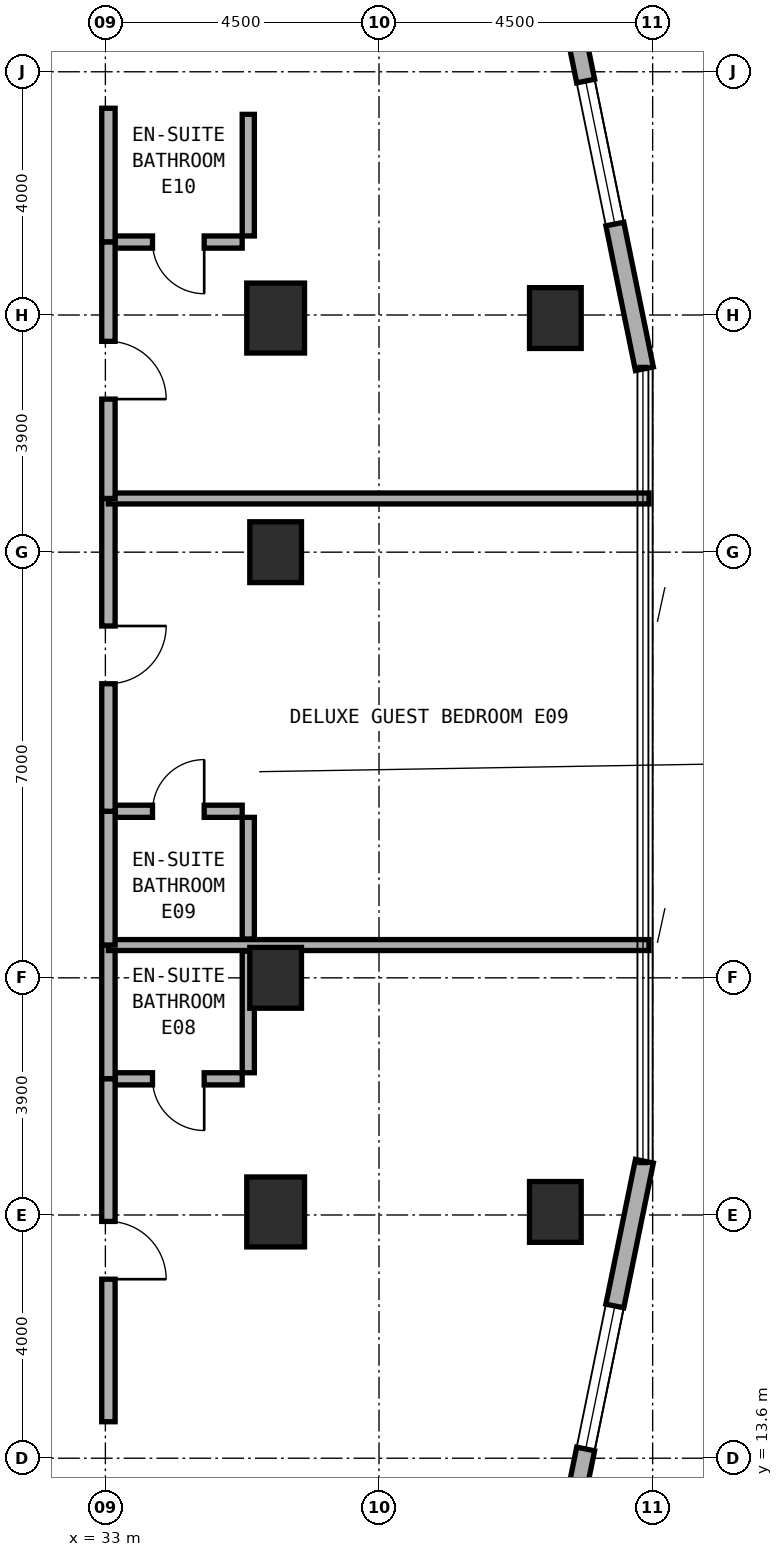
"""IFC4 building model, lengths in metres.
Left out: names, types, materials, properties, quantities, classifications, styles, units other than length and angle.
Written with IfcOpenShell. Run it as: python <this file> out.ifc"""

import sys

from ifc_helpers import new_model, si_unit, direction, frame, frame_2d, origin, origin_2d, place, context, subcontext, project, spatial, rectangle, extrude, element, fill, save


model = new_model("IFC4")
c1 = context("Model", 3, precision=1e-05, world=origin(), true_north=direction((0.0, 1.0)))
c2 = subcontext(c1, "Body", "Model", "MODEL_VIEW")
j1 = project(units=[si_unit("LENGTHUNIT", "METRE"), si_unit("PLANEANGLEUNIT", "RADIAN")], contexts=[c1])
p1 = place(None, origin())
s1 = spatial("IfcSite", under=j1, at=p1, CompositionType="ELEMENT")
p2 = place(p1, origin())
s2 = spatial("IfcBuilding", under=s1, at=p2, CompositionType="ELEMENT")
p3 = place(p2, frame((0.0, 0.0, 80.0)))
s3 = spatial("IfcBuildingStorey", under=s2, at=p3, CompositionType="ELEMENT", Elevation=80.0)
for number, where, z_axis, x_axis in (
    (1, (35.8, 21.5, 0.0), (0.0, 0.0, 1.0), (1.0, 0.0, 0.0)),
    (2, (35.8, 28.5, 0.0), (0.0, 0.0, 1.0), (1.0, 0.0, 0.0)),
):
    element("IfcColumn", number, at=place(p3, frame(where, z_axis=z_axis, x_axis=x_axis)), inside=s3, PredefinedType="COLUMN", context=c2, shape_type="SweptSolid", body=[
        extrude(rectangle(XDim=0.85, YDim=1.0, at=origin_2d()), origin(), (0.0, 0.0, 1.0), 3.5),
    ])
for number, where, z_axis, x_axis in (
    (3, (35.8, 17.65, 0.0), (0.0, 0.0, 1.0), (1.0, 0.0, 0.0)),
    (4, (35.8, 32.35, 0.0), (0.0, 0.0, 1.0), (1.0, 0.0, 0.0)),
):
    element("IfcColumn", number, at=place(p3, frame(where, z_axis=z_axis, x_axis=x_axis)), inside=s3, PredefinedType="COLUMN", context=c2, shape_type="SweptSolid", body=[
        extrude(rectangle(XDim=0.95, YDim=1.15, at=origin_2d()), origin(), (0.0, 0.0, 1.0), 3.5),
    ])
for number, where, z_axis, x_axis in (
    (5, (40.4, 17.65, 0.0), (0.0, 0.0, 1.0), (1.0, 0.0, 0.0)),
    (6, (40.4, 32.35, 0.0), (0.0, 0.0, 1.0), (1.0, 0.0, 0.0)),
):
    element("IfcColumn", number, at=place(p3, frame(where, z_axis=z_axis, x_axis=x_axis)), inside=s3, PredefinedType="COLUMN", context=c2, shape_type="SweptSolid", body=[
        extrude(rectangle(XDim=0.85, YDim=1.0, at=origin_2d()), origin(), (0.0, 0.0, 1.0), 3.5),
    ])
p4 = place(p3, frame((39.851, 8.622, 0.0), z_axis=(0.0, 0.0, 1.0), x_axis=(0.199990901713, 0.979797754249, 0.0)))
e7 = element("IfcWall", 7, at=p4, inside=s3, PredefinedType="STANDARD", context=c2, shape_type="SweptSolid", body=[
    extrude(rectangle(XDim=10.065, YDim=0.3, at=frame_2d((5.033, 0.0))), origin(), (0.0, 0.0, 1.0), 3.22),
])
p5 = place(p4, frame((0.378, 0.0, 0.85)))
e8 = element("IfcOpeningElement", 8, at=p5, cuts=e7, PredefinedType="OPENING", context=c2, shape_type="SweptSolid", body=[
    extrude(rectangle(XDim=1.8, YDim=1.5, at=frame_2d((0.9, 0.75))), frame((0.0, 0.16, 0.0), z_axis=(0.0, -1.0, 0.0), x_axis=(1.0, 0.0, 0.0)), (0.0, 0.0, 1.0), 0.32),
])
p6 = place(p4, frame((5.236, 0.0, 0.8)))
e9 = element("IfcOpeningElement", 9, at=p6, cuts=e7, PredefinedType="OPENING", context=c2, shape_type="SweptSolid", body=[
    extrude(rectangle(XDim=2.4, YDim=1.6, at=frame_2d((1.2, 0.8))), frame((0.0, 0.16, 0.0), z_axis=(0.0, -1.0, 0.0), x_axis=(1.0, 0.0, 0.0)), (0.0, 0.0, 1.0), 0.32),
])
p7 = place(p3, frame((41.864, 31.516, 0.0), z_axis=(0.0, 0.0, 1.0), x_axis=(-0.199990901713, 0.979797754249, 0.0)))
e10 = element("IfcWall", 10, at=p7, inside=s3, PredefinedType="STANDARD", context=c2, shape_type="SweptSolid", body=[
    extrude(rectangle(XDim=10.065, YDim=0.3, at=frame_2d((5.033, 0.0))), origin(), (0.0, 0.0, 1.0), 3.22),
])
p8 = place(p7, frame((2.429, 0.0, 0.8)))
e11 = element("IfcOpeningElement", 11, at=p8, cuts=e10, PredefinedType="OPENING", context=c2, shape_type="SweptSolid", body=[
    extrude(rectangle(XDim=2.4, YDim=1.6, at=frame_2d((1.2, 0.8))), frame((0.0, 0.16, 0.0), z_axis=(0.0, -1.0, 0.0), x_axis=(1.0, 0.0, 0.0)), (0.0, 0.0, 1.0), 0.32),
])
p9 = place(p7, frame((7.887, 0.0, 0.85)))
e12 = element("IfcOpeningElement", 12, at=p9, cuts=e10, PredefinedType="OPENING", context=c2, shape_type="SweptSolid", body=[
    extrude(rectangle(XDim=1.8, YDim=1.5, at=frame_2d((0.9, 0.75))), frame((0.0, 0.16, 0.0), z_axis=(0.0, -1.0, 0.0), x_axis=(1.0, 0.0, 0.0)), (0.0, 0.0, 1.0), 0.32),
])
p10 = place(p3, frame((33.15, 19.839, 0.0), z_axis=(0.0, 0.0, 1.0), x_axis=(1.0, 0.0, 0.0)))
e13 = element("IfcWall", 13, at=p10, inside=s3, PredefinedType="PLUMBINGWALL", context=c2, shape_type="SweptSolid", body=[
    extrude(rectangle(XDim=2.1, YDim=0.2, at=frame_2d((1.05, 0.0))), origin(), (0.0, 0.0, 1.0), 3.22),
])
p11 = place(p10, frame((0.625, 0.0, 0.0)))
e14 = element("IfcOpeningElement", 14, at=p11, cuts=e13, PredefinedType="OPENING", context=c2, shape_type="SweptSolid", body=[
    extrude(rectangle(XDim=0.85, YDim=2.1, at=frame_2d((0.425, 1.05))), frame((0.0, 0.11, 0.0), z_axis=(0.0, -1.0, 0.0), x_axis=(1.0, 0.0, 0.0)), (0.0, 0.0, 1.0), 0.22),
])
p12 = place(p3, frame((35.35, 19.939, 0.0), z_axis=(0.0, 0.0, 1.0), x_axis=(0.0, 1.0, 0.0)))
e15 = element("IfcWall", 15, at=p12, inside=s3, PredefinedType="PLUMBINGWALL", context=c2, shape_type="SweptSolid", body=[
    extrude(rectangle(XDim=2.0, YDim=0.2, at=frame_2d((1.0, 0.0))), origin(), (0.0, 0.0, 1.0), 2.495),
])
p13 = place(p3, frame((33.05, 19.839, 0.0), z_axis=(0.0, 0.0, 1.0), x_axis=(0.0, 1.0, 0.0)))
e16 = element("IfcWall", 16, at=p13, inside=s3, PredefinedType="SOLIDWALL", context=c2, shape_type="SweptSolid", body=[
    extrude(rectangle(XDim=2.2, YDim=0.22, at=frame_2d((1.1, 0.0))), origin(), (0.0, 0.0, 1.0), 2.495),
])
p14 = place(p3, frame((33.05, 14.2, 0.0), z_axis=(0.0, 0.0, 1.0), x_axis=(0.0, 1.0, 0.0)))
e17 = element("IfcWall", 17, at=p14, inside=s3, PredefinedType="SOLIDWALL", context=c2, shape_type="SweptSolid", body=[
    extrude(rectangle(XDim=5.639, YDim=0.22, at=frame_2d((2.82, 0.0))), origin(), (0.0, 0.0, 1.0), 2.495),
])
p15 = place(p14, frame((2.344, 0.0, 0.0)))
e18 = element("IfcOpeningElement", 18, at=p15, cuts=e17, PredefinedType="OPENING", context=c2, shape_type="SweptSolid", body=[
    extrude(rectangle(XDim=0.95, YDim=2.1, at=frame_2d((0.475, 1.05))), frame((0.0, 0.12, 0.0), z_axis=(0.0, -1.0, 0.0), x_axis=(1.0, 0.0, 0.0)), (0.0, 0.0, 1.0), 0.24),
])
p16 = place(p3, frame((33.05, 22.039, 0.0), z_axis=(0.0, 0.0, 1.0), x_axis=(1.0, 0.0, 0.0)))
e19 = element("IfcWall", 19, at=p16, inside=s3, PredefinedType="SOLIDWALL", context=c2, shape_type="SweptSolid", body=[
    extrude(rectangle(XDim=8.89, YDim=0.18, at=frame_2d((4.445, 0.0))), origin(), (0.0, 0.0, 1.0), 2.745),
])
p17 = place(p3, frame((33.15, 24.239, 0.0), z_axis=(0.0, 0.0, 1.0), x_axis=(1.0, 0.0, 0.0)))
e20 = element("IfcWall", 20, at=p17, inside=s3, PredefinedType="PLUMBINGWALL", context=c2, shape_type="SweptSolid", body=[
    extrude(rectangle(XDim=2.1, YDim=0.2, at=frame_2d((1.05, 0.0))), origin(), (0.0, 0.0, 1.0), 3.22),
])
p18 = place(p17, frame((0.625, 0.0, 0.0)))
e21 = element("IfcOpeningElement", 21, at=p18, cuts=e20, PredefinedType="OPENING", context=c2, shape_type="SweptSolid", body=[
    extrude(rectangle(XDim=0.85, YDim=2.1, at=frame_2d((0.425, 1.05))), frame((0.0, 0.11, 0.0), z_axis=(0.0, -1.0, 0.0), x_axis=(1.0, 0.0, 0.0)), (0.0, 0.0, 1.0), 0.22),
])
p19 = place(p3, frame((35.35, 22.139, 0.0), z_axis=(0.0, 0.0, 1.0), x_axis=(0.0, 1.0, 0.0)))
e22 = element("IfcWall", 22, at=p19, inside=s3, PredefinedType="PLUMBINGWALL", context=c2, shape_type="SweptSolid", body=[
    extrude(rectangle(XDim=2.0, YDim=0.2, at=frame_2d((1.0, 0.0))), origin(), (0.0, 0.0, 1.0), 3.22),
])
p20 = place(p3, frame((33.05, 22.039, 0.0), z_axis=(0.0, 0.0, 1.0), x_axis=(0.0, 1.0, 0.0)))
e23 = element("IfcWall", 23, at=p20, inside=s3, PredefinedType="SOLIDWALL", context=c2, shape_type="SweptSolid", body=[
    extrude(rectangle(XDim=2.2, YDim=0.22, at=frame_2d((1.1, 0.0))), origin(), (0.0, 0.0, 1.0), 3.22),
])
p21 = place(p3, frame((33.05, 24.239, 0.0), z_axis=(0.0, 0.0, 1.0), x_axis=(0.0, 1.0, 0.0)))
e24 = element("IfcWall", 24, at=p21, inside=s3, PredefinedType="SOLIDWALL", context=c2, shape_type="SweptSolid", body=[
    extrude(rectangle(XDim=5.144, YDim=0.22, at=frame_2d((2.572, 0.0))), origin(), (0.0, 0.0, 1.0), 2.495),
])
p22 = place(p21, frame((2.097, 0.0, 0.0)))
e25 = element("IfcOpeningElement", 25, at=p22, cuts=e24, PredefinedType="OPENING", context=c2, shape_type="SweptSolid", body=[
    extrude(rectangle(XDim=0.95, YDim=2.1, at=frame_2d((0.475, 1.05))), frame((0.0, 0.12, 0.0), z_axis=(0.0, -1.0, 0.0), x_axis=(1.0, 0.0, 0.0)), (0.0, 0.0, 1.0), 0.24),
])
p23 = place(p3, frame((33.05, 29.383, 0.0), z_axis=(0.0, 0.0, 1.0), x_axis=(1.0, 0.0, 0.0)))
e26 = element("IfcWall", 26, at=p23, inside=s3, PredefinedType="SOLIDWALL", context=c2, shape_type="SweptSolid", body=[
    extrude(rectangle(XDim=8.89, YDim=0.18, at=frame_2d((4.445, 0.0))), origin(), (0.0, 0.0, 1.0), 2.745),
])
p24 = place(p3, frame((33.15, 33.6, 0.0), z_axis=(0.0, 0.0, 1.0), x_axis=(1.0, 0.0, 0.0)))
e27 = element("IfcWall", 27, at=p24, inside=s3, PredefinedType="PLUMBINGWALL", context=c2, shape_type="SweptSolid", body=[
    extrude(rectangle(XDim=2.1, YDim=0.2, at=frame_2d((1.05, 0.0))), origin(), (0.0, 0.0, 1.0), 3.22),
])
p25 = place(p24, frame((0.625, 0.0, 0.0)))
e28 = element("IfcOpeningElement", 28, at=p25, cuts=e27, PredefinedType="OPENING", context=c2, shape_type="SweptSolid", body=[
    extrude(rectangle(XDim=0.85, YDim=2.1, at=frame_2d((0.425, 1.05))), frame((0.0, 0.11, 0.0), z_axis=(0.0, -1.0, 0.0), x_axis=(1.0, 0.0, 0.0)), (0.0, 0.0, 1.0), 0.22),
])
p26 = place(p3, frame((35.35, 33.7, 0.0), z_axis=(0.0, 0.0, 1.0), x_axis=(0.0, 1.0, 0.0)))
e29 = element("IfcWall", 29, at=p26, inside=s3, PredefinedType="PLUMBINGWALL", context=c2, shape_type="SweptSolid", body=[
    extrude(rectangle(XDim=2.0, YDim=0.2, at=frame_2d((1.0, 0.0))), origin(), (0.0, 0.0, 1.0), 2.745),
])
p27 = place(p3, frame((33.05, 33.6, 0.0), z_axis=(0.0, 0.0, 1.0), x_axis=(0.0, 1.0, 0.0)))
e30 = element("IfcWall", 30, at=p27, inside=s3, PredefinedType="SOLIDWALL", context=c2, shape_type="SweptSolid", body=[
    extrude(rectangle(XDim=2.2, YDim=0.22, at=frame_2d((1.1, 0.0))), origin(), (0.0, 0.0, 1.0), 3.22),
])
p28 = place(p3, frame((33.05, 29.383, 0.0), z_axis=(0.0, 0.0, 1.0), x_axis=(0.0, 1.0, 0.0)))
e31 = element("IfcWall", 31, at=p28, inside=s3, PredefinedType="SOLIDWALL", context=c2, shape_type="SweptSolid", body=[
    extrude(rectangle(XDim=4.217, YDim=0.22, at=frame_2d((2.108, 0.0))), origin(), (0.0, 0.0, 1.0), 2.495),
])
p29 = place(p28, frame((1.634, 0.0, 0.0)))
e32 = element("IfcOpeningElement", 32, at=p29, cuts=e31, PredefinedType="OPENING", context=c2, shape_type="SweptSolid", body=[
    extrude(rectangle(XDim=0.95, YDim=2.1, at=frame_2d((0.475, 1.05))), frame((0.0, 0.12, 0.0), z_axis=(0.0, -1.0, 0.0), x_axis=(1.0, 0.0, 0.0)), (0.0, 0.0, 1.0), 0.24),
])
p30 = place(p6, origin())
e33 = element("IfcWindow", 33, at=p30, inside=s3, PartitioningType="SINGLE_PANEL", PredefinedType="WINDOW", context=c2, shape_type="SweptSolid", body=[
    extrude(rectangle(XDim=2.4, YDim=1.6, at=frame_2d((1.2, 0.8))), frame((0.0, 0.03, 0.0), z_axis=(0.0, -1.0, 0.0), x_axis=(1.0, 0.0, 0.0)), (0.0, 0.0, 1.0), 0.06),
])
fill(e9, e33)
p31 = place(p8, origin())
e34 = element("IfcWindow", 34, at=p31, inside=s3, PartitioningType="SINGLE_PANEL", PredefinedType="WINDOW", context=c2, shape_type="SweptSolid", body=[
    extrude(rectangle(XDim=2.4, YDim=1.6, at=frame_2d((1.2, 0.8))), frame((0.0, 0.03, 0.0), z_axis=(0.0, -1.0, 0.0), x_axis=(1.0, 0.0, 0.0)), (0.0, 0.0, 1.0), 0.06),
])
fill(e11, e34)
p32 = place(p11, frame((0.85, 0.0, 0.0), z_axis=(0.0, 0.0, 1.0), x_axis=(-1.0, 0.0, 0.0)))
e35 = element("IfcDoor", 35, at=p32, inside=s3, OperationType="SINGLE_SWING_LEFT", PredefinedType="DOOR", context=c2, shape_type="SweptSolid", body=[
    extrude(rectangle(XDim=0.85, YDim=2.1, at=frame_2d((0.425, 1.05))), frame((0.0, 0.025, 0.0), z_axis=(0.0, -1.0, 0.0), x_axis=(1.0, 0.0, 0.0)), (0.0, 0.0, 1.0), 0.05),
])
fill(e14, e35)
p33 = place(p15, frame((0.95, 0.0, 0.0), z_axis=(0.0, 0.0, 1.0), x_axis=(-1.0, 0.0, 0.0)))
e36 = element("IfcDoor", 36, at=p33, inside=s3, OperationType="SINGLE_SWING_RIGHT", PredefinedType="DOOR", context=c2, shape_type="SweptSolid", body=[
    extrude(rectangle(XDim=0.95, YDim=2.1, at=frame_2d((0.475, 1.05))), frame((0.0, 0.025, 0.0), z_axis=(0.0, -1.0, 0.0), x_axis=(1.0, 0.0, 0.0)), (0.0, 0.0, 1.0), 0.05),
])
fill(e18, e36)
p34 = place(p18, origin())
e37 = element("IfcDoor", 37, at=p34, inside=s3, OperationType="SINGLE_SWING_RIGHT", PredefinedType="DOOR", context=c2, shape_type="SweptSolid", body=[
    extrude(rectangle(XDim=0.85, YDim=2.1, at=frame_2d((0.425, 1.05))), frame((0.0, 0.025, 0.0), z_axis=(0.0, -1.0, 0.0), x_axis=(1.0, 0.0, 0.0)), (0.0, 0.0, 1.0), 0.05),
])
fill(e21, e37)
p35 = place(p22, frame((0.95, 0.0, 0.0), z_axis=(0.0, 0.0, 1.0), x_axis=(-1.0, 0.0, 0.0)))
e38 = element("IfcDoor", 38, at=p35, inside=s3, OperationType="SINGLE_SWING_LEFT", PredefinedType="DOOR", context=c2, shape_type="SweptSolid", body=[
    extrude(rectangle(XDim=0.95, YDim=2.1, at=frame_2d((0.475, 1.05))), frame((0.0, 0.025, 0.0), z_axis=(0.0, -1.0, 0.0), x_axis=(1.0, 0.0, 0.0)), (0.0, 0.0, 1.0), 0.05),
])
fill(e25, e38)
p36 = place(p25, frame((0.85, 0.0, 0.0), z_axis=(0.0, 0.0, 1.0), x_axis=(-1.0, 0.0, 0.0)))
e39 = element("IfcDoor", 39, at=p36, inside=s3, OperationType="SINGLE_SWING_LEFT", PredefinedType="DOOR", context=c2, shape_type="SweptSolid", body=[
    extrude(rectangle(XDim=0.85, YDim=2.1, at=frame_2d((0.425, 1.05))), frame((0.0, 0.025, 0.0), z_axis=(0.0, -1.0, 0.0), x_axis=(1.0, 0.0, 0.0)), (0.0, 0.0, 1.0), 0.05),
])
fill(e28, e39)
p37 = place(p29, frame((0.95, 0.0, 0.0), z_axis=(0.0, 0.0, 1.0), x_axis=(-1.0, 0.0, 0.0)))
e40 = element("IfcDoor", 40, at=p37, inside=s3, OperationType="SINGLE_SWING_RIGHT", PredefinedType="DOOR", context=c2, shape_type="SweptSolid", body=[
    extrude(rectangle(XDim=0.95, YDim=2.1, at=frame_2d((0.475, 1.05))), frame((0.0, 0.025, 0.0), z_axis=(0.0, -1.0, 0.0), x_axis=(1.0, 0.0, 0.0)), (0.0, 0.0, 1.0), 0.05),
])
fill(e32, e40)
save(model, sys.argv[1])
